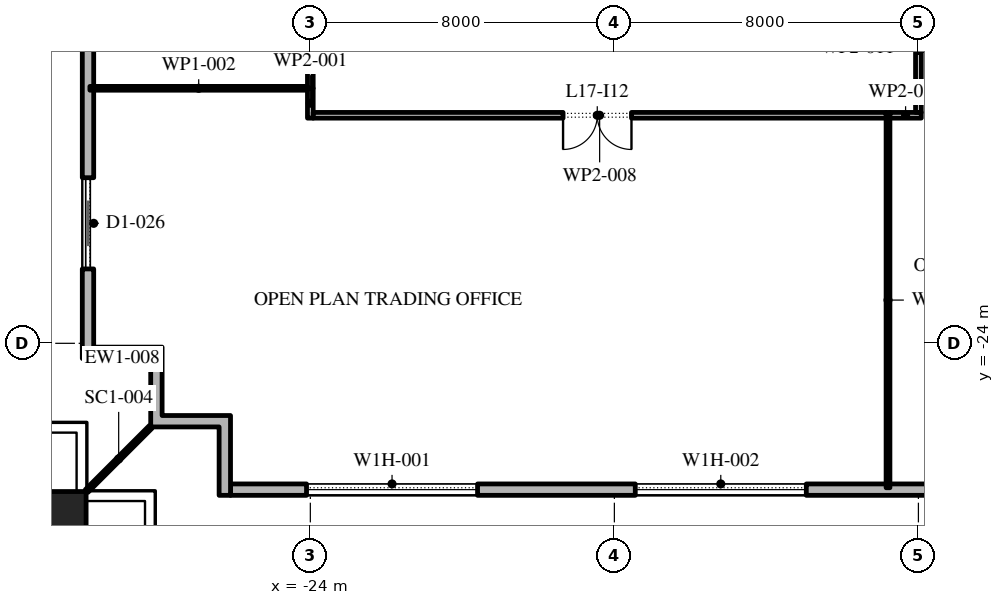
"""IFC4 building model, lengths in metres.
Left out: names, types, materials, properties, quantities, classifications, styles, units other than length and angle.
Written with IfcOpenShell. Run it as: python <this file> out.ifc"""

import sys

from ifc_helpers import new_model, si_unit, direction, frame, frame_2d, origin, origin_2d, place, context, subcontext, project, spatial, polyline, rectangle, outline, extrude, element, fill, save


model = new_model("IFC4")
c1 = context("Model", 3, precision=1e-05, world=origin(), true_north=direction((0.0, 1.0)))
c2 = subcontext(c1, "Body", "Model", "MODEL_VIEW")
j1 = project(units=[si_unit("LENGTHUNIT", "METRE"), si_unit("PLANEANGLEUNIT", "RADIAN")], contexts=[c1])
p1 = place(None, origin())
s1 = spatial("IfcSite", under=j1, at=p1, CompositionType="ELEMENT")
p2 = place(p1, origin())
s2 = spatial("IfcBuilding", under=s1, at=p2, CompositionType="ELEMENT")
p3 = place(p2, frame((0.0, 0.0, 81.6)))
s3 = spatial("IfcBuildingStorey", under=s2, at=p3, CompositionType="ELEMENT", Elevation=81.6)
p4 = place(p3, frame((-30.6, -28.6, 0.0), z_axis=(0.0, 0.0, 1.0), x_axis=(1.0, 0.0, 0.0)))
e1 = element("IfcColumn", 1, at=p4, inside=s3, PredefinedType="COLUMN", context=c2, shape_type="SweptSolid", body=[
    extrude(rectangle(XDim=1.4, YDim=1.4, at=origin_2d()), origin(), (0.0, 0.0, 1.0), 4.2),
])
p5 = place(p3, frame((-26.1, -27.85, 0.0), z_axis=(0.0, 0.0, 1.0), x_axis=(1.0, 0.0, 0.0)))
e2 = element("IfcWall", 2, at=p5, inside=s3, PredefinedType="STANDARD", context=c2, shape_type="SweptSolid", body=[
    extrude(rectangle(XDim=52.5, YDim=0.3, at=frame_2d((26.25, 0.0))), origin(), (0.0, 0.0, 1.0), 4.0),
])
p6 = place(p5, frame((2.0, 0.0, 0.45)))
e3 = element("IfcOpeningElement", 3, at=p6, cuts=e2, PredefinedType="OPENING", context=c2, shape_type="SweptSolid", body=[
    extrude(rectangle(XDim=4.5, YDim=2.75, at=frame_2d((2.25, 1.375))), frame((0.0, 0.16, 0.0), z_axis=(0.0, -1.0, 0.0), x_axis=(1.0, 0.0, 0.0)), (0.0, 0.0, 1.0), 0.32),
])
p7 = place(p5, frame((10.65, 0.0, 0.45)))
e4 = element("IfcOpeningElement", 4, at=p7, cuts=e2, PredefinedType="OPENING", context=c2, shape_type="SweptSolid", body=[
    extrude(rectangle(XDim=4.5, YDim=2.75, at=frame_2d((2.25, 1.375))), frame((0.0, 0.16, 0.0), z_axis=(0.0, -1.0, 0.0), x_axis=(1.0, 0.0, 0.0)), (0.0, 0.0, 1.0), 0.32),
])
p8 = place(p5, frame((20.5, 0.0, 0.0)))
e5 = element("IfcOpeningElement", 5, at=p8, cuts=e2, PredefinedType="OPENING", context=c2, shape_type="SweptSolid", body=[
    extrude(rectangle(XDim=2.4, YDim=3.5, at=frame_2d((1.2, 1.75))), frame((0.0, 0.16, 0.0), z_axis=(0.0, -1.0, 0.0), x_axis=(1.0, 0.0, 0.0)), (0.0, 0.0, 1.0), 0.32),
])
p9 = place(p5, frame((28.25, 0.0, 0.45)))
e6 = element("IfcOpeningElement", 6, at=p9, cuts=e2, PredefinedType="OPENING", context=c2, shape_type="SweptSolid", body=[
    extrude(rectangle(XDim=4.5, YDim=2.75, at=frame_2d((2.25, 1.375))), frame((0.0, 0.16, 0.0), z_axis=(0.0, -1.0, 0.0), x_axis=(1.0, 0.0, 0.0)), (0.0, 0.0, 1.0), 0.32),
])
p10 = place(p5, frame((37.05, 0.0, 0.45)))
e7 = element("IfcOpeningElement", 7, at=p10, cuts=e2, PredefinedType="OPENING", context=c2, shape_type="SweptSolid", body=[
    extrude(rectangle(XDim=4.5, YDim=2.75, at=frame_2d((2.25, 1.375))), frame((0.0, 0.16, 0.0), z_axis=(0.0, -1.0, 0.0), x_axis=(1.0, 0.0, 0.0)), (0.0, 0.0, 1.0), 0.32),
])
p11 = place(p5, frame((45.85, 0.0, 0.45)))
e8 = element("IfcOpeningElement", 8, at=p11, cuts=e2, PredefinedType="OPENING", context=c2, shape_type="SweptSolid", body=[
    extrude(rectangle(XDim=4.5, YDim=2.75, at=frame_2d((2.25, 1.375))), frame((0.0, 0.16, 0.0), z_axis=(0.0, -1.0, 0.0), x_axis=(1.0, 0.0, 0.0)), (0.0, 0.0, 1.0), 0.32),
])
p12 = place(p3, frame((-29.85, 25.1, 0.0), z_axis=(0.0, 0.0, 1.0), x_axis=(0.0, -1.0, 0.0)))
e9 = element("IfcWall", 9, at=p12, inside=s3, PredefinedType="STANDARD", context=c2, shape_type="SweptSolid", body=[
    extrude(rectangle(XDim=49.5, YDim=0.3, at=frame_2d((24.75, 0.0))), origin(), (0.0, 0.0, 1.0), 4.0),
])
p13 = place(p12, frame((1.157, 0.0, 0.45)))
e10 = element("IfcOpeningElement", 10, at=p13, cuts=e9, PredefinedType="OPENING", context=c2, shape_type="SweptSolid", body=[
    extrude(rectangle(XDim=4.5, YDim=2.875, at=frame_2d((2.25, 1.438))), frame((0.0, 0.16, 0.0), z_axis=(0.0, -1.0, 0.0), x_axis=(1.0, 0.0, 0.0)), (0.0, 0.0, 1.0), 0.32),
])
p14 = place(p12, frame((8.121, 0.0, 0.45)))
e11 = element("IfcOpeningElement", 11, at=p14, cuts=e9, PredefinedType="OPENING", context=c2, shape_type="SweptSolid", body=[
    extrude(rectangle(XDim=4.5, YDim=3.05, at=frame_2d((2.25, 1.525))), frame((0.0, 0.16, 0.0), z_axis=(0.0, -1.0, 0.0), x_axis=(1.0, 0.0, 0.0)), (0.0, 0.0, 1.0), 0.32),
])
p15 = place(p12, frame((16.286, 0.0, 0.0)))
e12 = element("IfcOpeningElement", 12, at=p15, cuts=e9, PredefinedType="OPENING", context=c2, shape_type="SweptSolid", body=[
    extrude(rectangle(XDim=2.4, YDim=3.325, at=frame_2d((1.2, 1.663))), frame((0.0, 0.16, 0.0), z_axis=(0.0, -1.0, 0.0), x_axis=(1.0, 0.0, 0.0)), (0.0, 0.0, 1.0), 0.32),
])
p16 = place(p12, frame((22.35, 0.0, 0.45)))
e13 = element("IfcOpeningElement", 13, at=p16, cuts=e9, PredefinedType="OPENING", context=c2, shape_type="SweptSolid", body=[
    extrude(rectangle(XDim=4.5, YDim=2.875, at=frame_2d((2.25, 1.438))), frame((0.0, 0.16, 0.0), z_axis=(0.0, -1.0, 0.0), x_axis=(1.0, 0.0, 0.0)), (0.0, 0.0, 1.0), 0.32),
])
p17 = place(p12, frame((29.464, 0.0, 0.45)))
e14 = element("IfcOpeningElement", 14, at=p17, cuts=e9, PredefinedType="OPENING", context=c2, shape_type="SweptSolid", body=[
    extrude(rectangle(XDim=4.5, YDim=2.875, at=frame_2d((2.25, 1.438))), frame((0.0, 0.16, 0.0), z_axis=(0.0, -1.0, 0.0), x_axis=(1.0, 0.0, 0.0)), (0.0, 0.0, 1.0), 0.32),
])
p18 = place(p12, frame((36.579, 0.0, 0.45)))
e15 = element("IfcOpeningElement", 15, at=p18, cuts=e9, PredefinedType="OPENING", context=c2, shape_type="SweptSolid", body=[
    extrude(rectangle(XDim=4.5, YDim=2.825, at=frame_2d((2.25, 1.413))), frame((0.0, 0.16, 0.0), z_axis=(0.0, -1.0, 0.0), x_axis=(1.0, 0.0, 0.0)), (0.0, 0.0, 1.0), 0.32),
])
p19 = place(p12, frame((44.743, 0.0, 0.0)))
e16 = element("IfcOpeningElement", 16, at=p19, cuts=e9, PredefinedType="OPENING", context=c2, shape_type="SweptSolid", body=[
    extrude(rectangle(XDim=2.4, YDim=3.5, at=frame_2d((1.2, 1.75))), frame((0.0, 0.16, 0.0), z_axis=(0.0, -1.0, 0.0), x_axis=(1.0, 0.0, 0.0)), (0.0, 0.0, 1.0), 0.32),
])
p20 = place(p3, origin())
e17 = element("IfcWall", 17, at=p20, inside=s3, PredefinedType="STANDARD", context=c2, shape_type="SweptSolid", body=[
    extrude(outline(polyline([(-26.4, -26.2), (-28.2, -26.2), (-28.2, -24.4), (-29.7, -24.4), (-29.7, -24.1), (-27.9, -24.1), (-27.9, -25.9), (-26.1, -25.9), (-26.1, -28.0), (-26.4, -28.0), (-26.4, -26.2)])), origin(), (0.0, 0.0, 1.0), 4.0),
])
p21 = place(p3, frame((-28.2, -26.2, -0.05), z_axis=(0.0, 0.0, 1.0), x_axis=(-0.707106781187, -0.707106781187, 0.0)))
e18 = element("IfcWall", 18, at=p21, inside=s3, PredefinedType="STANDARD", context=c2, shape_type="SweptSolid", body=[
    extrude(rectangle(XDim=2.385, YDim=0.1, at=frame_2d((1.192, 0.0))), origin(), (0.0, 0.0, 1.0), 4.05),
])
p22 = place(p3, frame((-24.0, -18.075, 0.0), z_axis=(0.0, 0.0, 1.0), x_axis=(0.0, 1.0, 0.0)))
e19 = element("IfcWall", 19, at=p22, inside=s3, PredefinedType="PARTITIONING", context=c2, shape_type="SweptSolid", body=[
    extrude(rectangle(XDim=0.785, YDim=0.15, at=frame_2d((0.393, 0.0))), origin(), (0.0, 0.0, 1.0), 4.0),
])
p23 = place(p3, frame((-24.075, -17.29, 0.0), z_axis=(0.0, 0.0, 1.0), x_axis=(-1.0, 0.0, 0.0)))
e20 = element("IfcWall", 20, at=p23, inside=s3, PredefinedType="PARTITIONING", context=c2, shape_type="SweptSolid", body=[
    extrude(rectangle(XDim=5.725, YDim=0.1, at=frame_2d((2.863, 0.0))), origin(), (0.0, 0.0, 1.0), 4.0),
])
p24 = place(p3, frame((-24.0, -17.29, 0.0), z_axis=(0.0, 0.0, 1.0), x_axis=(0.0, 1.0, 0.0)))
e21 = element("IfcWall", 21, at=p24, inside=s3, PredefinedType="PARTITIONING", context=c2, shape_type="SweptSolid", body=[
    extrude(rectangle(XDim=14.23, YDim=0.15, at=frame_2d((7.115, 0.0))), origin(), (0.0, 0.0, 1.0), 4.0),
])
p25 = place(p24, frame((5.08, 0.0, 0.0)))
e22 = element("IfcOpeningElement", 22, at=p25, cuts=e21, PredefinedType="OPENING", context=c2, shape_type="SweptSolid", body=[
    extrude(rectangle(XDim=1.0, YDim=2.1, at=frame_2d((0.5, 1.05))), frame((0.0, 0.085, 0.0), z_axis=(0.0, -1.0, 0.0), x_axis=(1.0, 0.0, 0.0)), (0.0, 0.0, 1.0), 0.17),
])
p26 = place(p3, frame((-8.8, -27.8, 0.0), z_axis=(0.0, 0.0, 1.0), x_axis=(0.0, 1.0, 0.0)))
e23 = element("IfcWall", 23, at=p26, inside=s3, PredefinedType="PARTITIONING", context=c2, shape_type="SweptSolid", body=[
    extrude(rectangle(XDim=9.875, YDim=0.1, at=frame_2d((4.938, 0.0))), origin(), (0.0, 0.0, 1.0), 4.0),
])
p27 = place(p3, frame((-8.85, -18.0, 0.0), z_axis=(0.0, 0.0, 1.0), x_axis=(-1.0, 0.0, 0.0)))
e24 = element("IfcWall", 24, at=p27, inside=s3, PredefinedType="PARTITIONING", context=c2, shape_type="SweptSolid", body=[
    extrude(rectangle(XDim=15.075, YDim=0.15, at=frame_2d((7.538, 0.0))), origin(), (0.0, 0.0, 1.0), 4.0),
])
p28 = place(p27, frame((6.7, 0.0, 0.0)))
e25 = element("IfcOpeningElement", 25, at=p28, cuts=e24, PredefinedType="OPENING", context=c2, shape_type="SweptSolid", body=[
    extrude(rectangle(XDim=1.8, YDim=2.1, at=frame_2d((0.9, 1.05))), frame((0.0, 0.085, 0.0), z_axis=(0.0, -1.0, 0.0), x_axis=(1.0, 0.0, 0.0)), (0.0, 0.0, 1.0), 0.17),
])
p29 = place(p3, frame((-7.925, -18.0, 0.0), z_axis=(0.0, 0.0, 1.0), x_axis=(-1.0, 0.0, 0.0)))
e26 = element("IfcWall", 26, at=p29, inside=s3, PredefinedType="PARTITIONING", context=c2, shape_type="SweptSolid", body=[
    extrude(rectangle(XDim=0.825, YDim=0.15, at=frame_2d((0.413, 0.0))), origin(), (0.0, 0.0, 1.0), 4.0),
])
p30 = place(p3, frame((-8.0, -14.55, 0.0), z_axis=(0.0, 0.0, 1.0), x_axis=(0.0, -1.0, 0.0)))
e27 = element("IfcWall", 27, at=p30, inside=s3, PredefinedType="PARTITIONING", context=c2, shape_type="SweptSolid", body=[
    extrude(rectangle(XDim=3.375, YDim=0.15, at=frame_2d((1.688, 0.0))), origin(), (0.0, 0.0, 1.0), 4.0),
])
p31 = place(p30, frame((0.8, 0.0, 0.0)))
e28 = element("IfcOpeningElement", 28, at=p31, cuts=e27, PredefinedType="OPENING", context=c2, shape_type="SweptSolid", body=[
    extrude(rectangle(XDim=1.0, YDim=2.1, at=frame_2d((0.5, 1.05))), frame((0.0, 0.085, 0.0), z_axis=(0.0, -1.0, 0.0), x_axis=(1.0, 0.0, 0.0)), (0.0, 0.0, 1.0), 0.17),
])
p32 = place(p6, origin())
e29 = element("IfcWindow", 29, at=p32, inside=s3, PartitioningType="DOUBLE_PANEL_VERTICAL", PredefinedType="WINDOW", context=c2, shape_type="SweptSolid", body=[
    extrude(rectangle(XDim=4.5, YDim=2.75, at=frame_2d((2.25, 1.375))), frame((0.0, 0.03, 0.0), z_axis=(0.0, -1.0, 0.0), x_axis=(1.0, 0.0, 0.0)), (0.0, 0.0, 1.0), 0.06),
])
fill(e3, e29)
p33 = place(p7, origin())
e30 = element("IfcWindow", 30, at=p33, inside=s3, PartitioningType="DOUBLE_PANEL_VERTICAL", PredefinedType="WINDOW", context=c2, shape_type="SweptSolid", body=[
    extrude(rectangle(XDim=4.5, YDim=2.75, at=frame_2d((2.25, 1.375))), frame((0.0, 0.03, 0.0), z_axis=(0.0, -1.0, 0.0), x_axis=(1.0, 0.0, 0.0)), (0.0, 0.0, 1.0), 0.06),
])
fill(e4, e30)
p34 = place(p19, origin())
e31 = element("IfcDoor", 31, at=p34, inside=s3, OperationType="DOUBLE_DOOR_SLIDING", PredefinedType="DOOR", context=c2, shape_type="SweptSolid", body=[
    extrude(rectangle(XDim=2.4, YDim=3.5, at=frame_2d((1.2, 1.75))), frame((0.0, 0.025, 0.0), z_axis=(0.0, -1.0, 0.0), x_axis=(1.0, 0.0, 0.0)), (0.0, 0.0, 1.0), 0.05),
])
fill(e16, e31)
p35 = place(p31, origin())
e32 = element("IfcDoor", 32, at=p35, inside=s3, OperationType="SINGLE_SWING_RIGHT", PredefinedType="DOOR", context=c2, shape_type="SweptSolid", body=[
    extrude(rectangle(XDim=1.0, YDim=2.1, at=frame_2d((0.5, 1.05))), frame((0.0, 0.025, 0.0), z_axis=(0.0, -1.0, 0.0), x_axis=(1.0, 0.0, 0.0)), (0.0, 0.0, 1.0), 0.05),
])
fill(e28, e32)
p36 = place(p28, origin())
e33 = element("IfcDoor", 33, at=p36, inside=s3, OperationType="SINGLE_SWING_LEFT", PredefinedType="DOOR", context=c2, shape_type="SweptSolid", body=[
    extrude(rectangle(XDim=1.8, YDim=2.1, at=frame_2d((0.9, 1.05))), frame((0.0, 0.025, 0.0), z_axis=(0.0, -1.0, 0.0), x_axis=(1.0, 0.0, 0.0)), (0.0, 0.0, 1.0), 0.05),
])
fill(e25, e33)
save(model, sys.argv[1])
